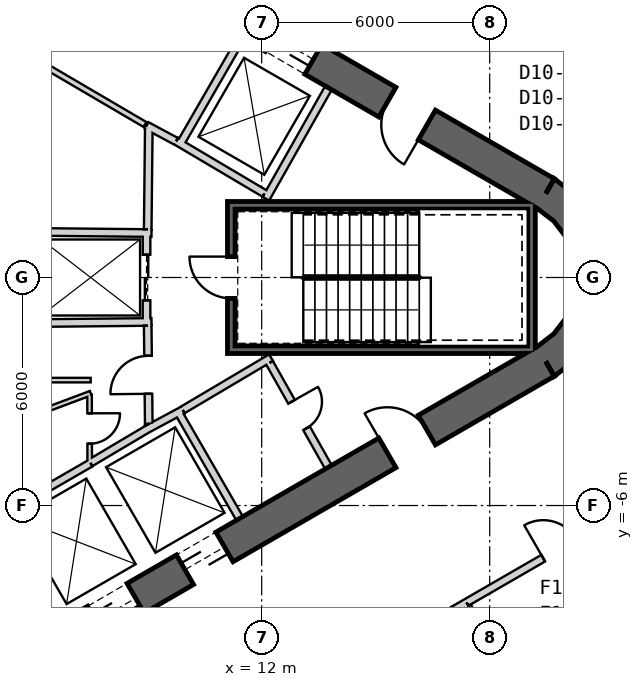
"""IFC4 building model, lengths in metres.
Left out: names, types, materials, properties, quantities, classifications, styles, units other than length and angle.
Written with IfcOpenShell. Run it as: python <this file> out.ifc"""

import sys

from ifc_helpers import new_model, si_unit, direction, frame, frame_2d, origin, place, context, subcontext, project, spatial, polyline, rectangle, outline, extrude, element, fill, save


model = new_model("IFC4")
c1 = context("Model", 3, precision=1e-05, world=origin(), true_north=direction((0.0, 1.0)))
c2 = subcontext(c1, "Body", "Model", "MODEL_VIEW")
j1 = project(units=[si_unit("LENGTHUNIT", "METRE"), si_unit("PLANEANGLEUNIT", "RADIAN")], contexts=[c1])
p1 = place(None, origin())
s1 = spatial("IfcSite", under=j1, at=p1, CompositionType="ELEMENT")
p2 = place(p1, origin())
s2 = spatial("IfcBuilding", under=s1, at=p2, CompositionType="ELEMENT")
p3 = place(p2, frame((0.0, 0.0, 253.2)))
s3 = spatial("IfcBuildingStorey", under=s2, at=p3, CompositionType="ELEMENT", Elevation=253.2)
p4 = place(p3, frame((19.475, 2.208, 0.0), z_axis=(0.0, 0.0, 1.0), x_axis=(-0.866028369851, 0.499994862586, 0.0)))
e1 = element("IfcWall", 1, at=p4, inside=s3, PredefinedType="SHEAR", context=c2, shape_type="SweptSolid", body=[
    extrude(rectangle(XDim=31.523, YDim=0.9, at=frame_2d((15.762, 0.0))), origin(), (0.0, 0.0, 1.0), 4.0),
])
p5 = place(p4, frame((7.062, 0.0, 0.0)))
e2 = element("IfcOpeningElement", 2, at=p5, cuts=e1, PredefinedType="OPENING", context=c2, shape_type="SweptSolid", body=[
    extrude(rectangle(XDim=1.2, YDim=2.4, at=frame_2d((0.6, 1.2))), frame((0.0, 0.46, 0.0), z_axis=(0.0, -1.0, 0.0), x_axis=(1.0, 0.0, 0.0)), (0.0, 0.0, 1.0), 0.92),
])
p6 = place(p4, frame((3.612, 0.0, 0.0)))
e3 = element("IfcOpeningElement", 3, at=p6, cuts=e1, PredefinedType="OPENING", context=c2, shape_type="SweptSolid", body=[
    extrude(rectangle(XDim=1.2, YDim=2.4, at=frame_2d((0.6, 1.2))), frame((0.0, 0.46, 0.0), z_axis=(0.0, -1.0, 0.0), x_axis=(1.0, 0.0, 0.0)), (0.0, 0.0, 1.0), 0.92),
])
p7 = place(p4, frame((26.712, 0.0, 0.0)))
e4 = element("IfcOpeningElement", 4, at=p7, cuts=e1, PredefinedType="OPENING", context=c2, shape_type="SweptSolid", body=[
    extrude(rectangle(XDim=1.2, YDim=2.4, at=frame_2d((0.6, 1.2))), frame((0.0, 0.46, 0.0), z_axis=(0.0, -1.0, 0.0), x_axis=(1.0, 0.0, 0.0)), (0.0, 0.0, 1.0), 0.92),
])
p8 = place(p3, frame((-7.825, -17.97, 0.0), z_axis=(0.0, 0.0, 1.0), x_axis=(0.866028369851, 0.499994862586, 0.0)))
e5 = element("IfcWall", 5, at=p8, inside=s3, PredefinedType="SHEAR", context=c2, shape_type="SweptSolid", body=[
    extrude(rectangle(XDim=31.523, YDim=0.9, at=frame_2d((15.762, 0.0))), origin(), (0.0, 0.0, 1.0), 4.0),
])
p9 = place(p8, frame((7.062, 0.0, 0.0)))
e6 = element("IfcOpeningElement", 6, at=p9, cuts=e5, PredefinedType="OPENING", context=c2, shape_type="SweptSolid", body=[
    extrude(rectangle(XDim=1.2, YDim=2.4, at=frame_2d((0.6, 1.2))), frame((0.0, 0.46, 0.0), z_axis=(0.0, -1.0, 0.0), x_axis=(1.0, 0.0, 0.0)), (0.0, 0.0, 1.0), 0.92),
])
p10 = place(p8, frame((9.762, 0.0, 0.0)))
e7 = element("IfcOpeningElement", 7, at=p10, cuts=e5, PredefinedType="OPENING", context=c2, shape_type="SweptSolid", body=[
    extrude(rectangle(XDim=1.2, YDim=2.4, at=frame_2d((0.6, 1.2))), frame((0.0, 0.46, 0.0), z_axis=(0.0, -1.0, 0.0), x_axis=(1.0, 0.0, 0.0)), (0.0, 0.0, 1.0), 0.92),
])
p11 = place(p8, frame((12.462, 0.0, 0.0)))
e8 = element("IfcOpeningElement", 8, at=p11, cuts=e5, PredefinedType="OPENING", context=c2, shape_type="SweptSolid", body=[
    extrude(rectangle(XDim=1.2, YDim=2.4, at=frame_2d((0.6, 1.2))), frame((0.0, 0.46, 0.0), z_axis=(0.0, -1.0, 0.0), x_axis=(1.0, 0.0, 0.0)), (0.0, 0.0, 1.0), 0.92),
])
p12 = place(p8, frame((15.162, 0.0, 0.0)))
e9 = element("IfcOpeningElement", 9, at=p12, cuts=e5, PredefinedType="OPENING", context=c2, shape_type="SweptSolid", body=[
    extrude(rectangle(XDim=1.2, YDim=2.4, at=frame_2d((0.6, 1.2))), frame((0.0, 0.46, 0.0), z_axis=(0.0, -1.0, 0.0), x_axis=(1.0, 0.0, 0.0)), (0.0, 0.0, 1.0), 0.92),
])
p13 = place(p8, frame((17.862, 0.0, 0.0)))
e10 = element("IfcOpeningElement", 10, at=p13, cuts=e5, PredefinedType="OPENING", context=c2, shape_type="SweptSolid", body=[
    extrude(rectangle(XDim=1.2, YDim=2.4, at=frame_2d((0.6, 1.2))), frame((0.0, 0.46, 0.0), z_axis=(0.0, -1.0, 0.0), x_axis=(1.0, 0.0, 0.0)), (0.0, 0.0, 1.0), 0.92),
])
p14 = place(p8, frame((20.562, 0.0, 0.0)))
e11 = element("IfcOpeningElement", 11, at=p14, cuts=e5, PredefinedType="OPENING", context=c2, shape_type="SweptSolid", body=[
    extrude(rectangle(XDim=1.2, YDim=2.4, at=frame_2d((0.6, 1.2))), frame((0.0, 0.46, 0.0), z_axis=(0.0, -1.0, 0.0), x_axis=(1.0, 0.0, 0.0)), (0.0, 0.0, 1.0), 0.92),
])
p15 = place(p8, frame((26.712, 0.0, 0.0)))
e12 = element("IfcOpeningElement", 12, at=p15, cuts=e5, PredefinedType="OPENING", context=c2, shape_type="SweptSolid", body=[
    extrude(rectangle(XDim=1.2, YDim=2.4, at=frame_2d((0.6, 1.2))), frame((0.0, 0.46, 0.0), z_axis=(0.0, -1.0, 0.0), x_axis=(1.0, 0.0, 0.0)), (0.0, 0.0, 1.0), 0.92),
])
p16 = place(p8, frame((3.612, 0.0, 0.0)))
e13 = element("IfcOpeningElement", 13, at=p16, cuts=e5, PredefinedType="OPENING", context=c2, shape_type="SweptSolid", body=[
    extrude(rectangle(XDim=1.2, YDim=2.4, at=frame_2d((0.6, 1.2))), frame((0.0, 0.46, 0.0), z_axis=(0.0, -1.0, 0.0), x_axis=(1.0, 0.0, 0.0)), (0.0, 0.0, 1.0), 0.92),
])
p17 = place(p3, origin())
e14 = element("IfcWall", 14, at=p17, inside=s3, PredefinedType="SHEAR", context=c2, shape_type="SweptSolid", body=[
    extrude(outline(polyline([(19.7, -2.598), (20.321, -2.121), (20.798, -1.5), (21.098, -0.777), (21.2, 0.0), (21.098, 0.777), (20.798, 1.5), (20.321, 2.121), (19.7, 2.598), (19.25, 1.819), (19.685, 1.485), (20.019, 1.05), (20.229, 0.543), (20.3, 0.0), (20.229, -0.543), (20.019, -1.05), (19.685, -1.485), (19.25, -1.819), (19.7, -2.598)])), origin(), (0.0, 0.0, 1.0), 4.0),
])
p18 = place(p3, frame((9.847, 3.495, 0.0), z_axis=(0.0, 0.0, 1.0), x_axis=(0.499984717929, 0.866034226713, 0.0)))
e15 = element("IfcWall", 15, at=p18, inside=s3, PredefinedType="PLUMBINGWALL", context=c2, shape_type="SweptSolid", body=[
    extrude(rectangle(XDim=3.25, YDim=0.2, at=frame_2d((1.625, 0.0))), origin(), (0.0, 0.0, 1.0), 3.7),
])
p19 = place(p3, frame((12.11, 2.073, 0.0), z_axis=(0.0, 0.0, 1.0), x_axis=(0.49196600604, 0.870614408852, 0.0)))
e16 = element("IfcWall", 16, at=p19, inside=s3, PredefinedType="PLUMBINGWALL", context=c2, shape_type="SweptSolid", body=[
    extrude(rectangle(XDim=3.35, YDim=0.2, at=frame_2d((1.675, 0.0))), origin(), (0.0, 0.0, 1.0), 3.7),
])
p20 = place(p3, frame((12.073, 2.211, 0.0), z_axis=(0.0, 0.0, 1.0), x_axis=(-0.860414880418, 0.509594185166, 0.0)))
e17 = element("IfcWall", 17, at=p20, inside=s3, PredefinedType="PLUMBINGWALL", context=c2, shape_type="SweptSolid", body=[
    extrude(rectangle(XDim=2.7, YDim=0.2, at=frame_2d((1.35, 0.0))), origin(), (0.0, 0.0, 1.0), 3.7),
])
p21 = place(p3, frame((0.483, -8.936, 0.0), z_axis=(0.0, 0.0, 1.0), x_axis=(0.866030989016, 0.499990325971, 0.0)))
e18 = element("IfcWall", 18, at=p21, inside=s3, PredefinedType="PLUMBINGWALL", context=c2, shape_type="SweptSolid", body=[
    extrude(rectangle(XDim=8.1, YDim=0.2, at=frame_2d((4.05, 0.0))), origin(), (0.0, 0.0, 1.0), 3.7),
])
p22 = place(p3, frame((9.795, -3.525, 0.0), z_axis=(0.0, 0.0, 1.0), x_axis=(0.499984717929, -0.866034226713, 0.0)))
e19 = element("IfcWall", 19, at=p22, inside=s3, PredefinedType="PLUMBINGWALL", context=c2, shape_type="SweptSolid", body=[
    extrude(rectangle(XDim=3.25, YDim=0.2, at=frame_2d((1.625, 0.0))), origin(), (0.0, 0.0, 1.0), 3.7),
])
p23 = place(p3, frame((8.974, -3.999, 0.0), z_axis=(0.0, 0.0, 1.0), x_axis=(0.880907015104, 0.473289373154, 0.0)))
e20 = element("IfcWall", 20, at=p23, inside=s3, PredefinedType="PLUMBINGWALL", context=c2, shape_type="SweptSolid", body=[
    extrude(rectangle(XDim=1.078, YDim=0.2, at=frame_2d((0.539, 0.0))), origin(), (0.0, 0.0, 1.0), 3.7),
])
p24 = place(p3, frame((7.493, -4.878, 0.0), z_axis=(0.0, 0.0, 1.0), x_axis=(0.859981807212, 0.510324691999, 0.0)))
e21 = element("IfcWall", 21, at=p24, inside=s3, PredefinedType="PLUMBINGWALL", context=c2, shape_type="SweptSolid", body=[
    extrude(rectangle(XDim=1.845, YDim=0.2, at=frame_2d((0.922, 0.0))), origin(), (0.0, 0.0, 1.0), 3.7),
])
p25 = place(p3, frame((19.2, 1.9, -0.3), z_axis=(0.0, 0.0, 1.0), x_axis=(-1.0, 0.0, 0.0)))
e22 = element("IfcWall", 22, at=p25, inside=s3, PredefinedType="SHEAR", context=c2, shape_type="SweptSolid", body=[
    extrude(rectangle(XDim=8.1, YDim=0.2, at=frame_2d((4.05, 0.0))), origin(), (0.0, 0.0, 1.0), 4.0),
])
p26 = place(p3, frame((19.1, -2.0, -0.3), z_axis=(0.0, 0.0, 1.0), x_axis=(0.0, 1.0, 0.0)))
e23 = element("IfcWall", 23, at=p26, inside=s3, PredefinedType="SHEAR", context=c2, shape_type="SweptSolid", body=[
    extrude(rectangle(XDim=3.8, YDim=0.2, at=frame_2d((1.9, 0.0))), origin(), (0.0, 0.0, 1.0), 4.0),
])
p27 = place(p3, frame((11.1, -1.9, -0.3), z_axis=(0.0, 0.0, 1.0), x_axis=(1.0, 0.0, 0.0)))
e24 = element("IfcWall", 24, at=p27, inside=s3, PredefinedType="SHEAR", context=c2, shape_type="SweptSolid", body=[
    extrude(rectangle(XDim=7.9, YDim=0.2, at=frame_2d((3.95, 0.0))), origin(), (0.0, 0.0, 1.0), 4.0),
])
p28 = place(p3, frame((11.2, -1.8, -0.3), z_axis=(0.0, 0.0, 1.0), x_axis=(0.0, 1.0, 0.0)))
e25 = element("IfcWall", 25, at=p28, inside=s3, PredefinedType="SHEAR", context=c2, shape_type="SweptSolid", body=[
    extrude(rectangle(XDim=3.6, YDim=0.2, at=frame_2d((1.8, 0.0))), origin(), (0.0, 0.0, 1.0), 4.0),
])
p29 = place(p28, frame((1.25, 0.0, 0.3)))
e26 = element("IfcOpeningElement", 26, at=p29, cuts=e25, PredefinedType="OPENING", context=c2, shape_type="SweptSolid", body=[
    extrude(rectangle(XDim=1.1, YDim=2.1, at=frame_2d((0.55, 1.05))), frame((0.0, 0.11, 0.0), z_axis=(0.0, -1.0, 0.0), x_axis=(1.0, 0.0, 0.0)), (0.0, 0.0, 1.0), 0.22),
])
p30 = place(p3, frame((8.97, 1.2, 0.0), z_axis=(0.0, 0.0, 1.0), x_axis=(0.0, -1.0, 0.0)))
e27 = element("IfcWall", 27, at=p30, inside=s3, PredefinedType="PLUMBINGWALL", context=c2, shape_type="SweptSolid", body=[
    extrude(rectangle(XDim=2.4, YDim=0.2, at=frame_2d((1.2, 0.0))), origin(), (0.0, 0.0, 1.0), 3.7),
])
p31 = place(p30, frame((0.6, 0.0, 0.0)))
e28 = element("IfcOpeningElement", 28, at=p31, cuts=e27, PredefinedType="OPENING", context=c2, shape_type="SweptSolid", body=[
    extrude(rectangle(XDim=1.2, YDim=2.4, at=frame_2d((0.6, 1.2))), frame((0.0, 0.11, 0.0), z_axis=(0.0, -1.0, 0.0), x_axis=(1.0, 0.0, 0.0)), (0.0, 0.0, 1.0), 0.22),
])
p32 = place(p3, frame((6.0, 1.2, 0.0), z_axis=(0.0, 0.0, 1.0), x_axis=(0.999949988, -0.010001074852, 0.0)))
e29 = element("IfcWall", 29, at=p32, inside=s3, PredefinedType="PLUMBINGWALL", context=c2, shape_type="SweptSolid", body=[
    extrude(rectangle(XDim=3.1, YDim=0.2, at=frame_2d((1.55, 0.0))), origin(), (0.0, 0.0, 1.0), 3.7),
])
p33 = place(p3, frame((5.9, -1.201, 0.0), z_axis=(0.0, 0.0, 1.0), x_axis=(0.999950064753, 0.009993397809, 0.0)))
e30 = element("IfcWall", 30, at=p33, inside=s3, PredefinedType="PLUMBINGWALL", context=c2, shape_type="SweptSolid", body=[
    extrude(rectangle(XDim=3.2, YDim=0.2, at=frame_2d((1.6, 0.0))), origin(), (0.0, 0.0, 1.0), 3.7),
])
p34 = place(p3, frame((8.974, 3.999, 0.0), z_axis=(0.0, 0.0, 1.0), x_axis=(0.880917147855, -0.473270513147, 0.0)))
e31 = element("IfcWall", 31, at=p34, inside=s3, PredefinedType="PARTITIONING", context=c2, shape_type="SweptSolid", body=[
    extrude(rectangle(XDim=0.878, YDim=0.2, at=frame_2d((0.439, 0.0))), origin(), (0.0, 0.0, 1.0), 3.7),
])
p35 = place(p3, frame((8.931, 4.025, 0.0), z_axis=(0.0, 0.0, 1.0), x_axis=(-0.862666884027, 0.505772525157, 0.0)))
e32 = element("IfcWall", 32, at=p35, inside=s3, PredefinedType="PLUMBINGWALL", context=c2, shape_type="SweptSolid", body=[
    extrude(rectangle(XDim=4.372, YDim=0.15, at=frame_2d((2.186, 0.0))), origin(), (0.0, 0.0, 1.0), 3.7),
])
p36 = place(p3, frame((12.245, -2.109, 0.0), z_axis=(0.0, 0.0, 1.0), x_axis=(-0.860414880418, -0.509594185166, 0.0)))
e33 = element("IfcWall", 33, at=p36, inside=s3, PredefinedType="PARTITIONING", context=c2, shape_type="SweptSolid", body=[
    extrude(rectangle(XDim=2.7, YDim=0.2, at=frame_2d((1.35, 0.0))), origin(), (0.0, 0.0, 1.0), 3.7),
])
p37 = place(p3, frame((13.758, -4.99, 0.0), z_axis=(0.0, 0.0, 1.0), x_axis=(-0.491993409184, 0.87059892334, 0.0)))
e34 = element("IfcWall", 34, at=p37, inside=s3, PredefinedType="PARTITIONING", context=c2, shape_type="SweptSolid", body=[
    extrude(rectangle(XDim=3.15, YDim=0.2, at=frame_2d((1.575, 0.0))), origin(), (0.0, 0.0, 1.0), 3.7),
])
p38 = place(p37, frame((1.175, 0.0, 0.0)))
e35 = element("IfcOpeningElement", 35, at=p38, cuts=e34, PredefinedType="OPENING", context=c2, shape_type="SweptSolid", body=[
    extrude(rectangle(XDim=0.8, YDim=2.1, at=frame_2d((0.4, 1.05))), frame((0.0, 0.11, 0.0), z_axis=(0.0, -1.0, 0.0), x_axis=(1.0, 0.0, 0.0)), (0.0, 0.0, 1.0), 0.22),
])
p39 = place(p3, frame((9.001, 1.27, 0.0), z_axis=(0.0, 0.0, 1.0), x_axis=(0.01074821465, 0.999942236273, 0.0)))
e36 = element("IfcWall", 36, at=p39, inside=s3, PredefinedType="PARTITIONING", context=c2, shape_type="SweptSolid", body=[
    extrude(rectangle(XDim=2.726, YDim=0.2, at=frame_2d((1.363, 0.0))), origin(), (0.0, 0.0, 1.0), 3.7),
])
p40 = place(p3, frame((9.029, -3.851, 0.0), z_axis=(0.0, 0.0, 1.0), x_axis=(-0.010783593937, 0.99994185536, 0.0)))
e37 = element("IfcWall", 37, at=p40, inside=s3, PredefinedType="PARTITIONING", context=c2, shape_type="SweptSolid", body=[
    extrude(rectangle(XDim=2.581, YDim=0.2, at=frame_2d((1.291, 0.0))), origin(), (0.0, 0.0, 1.0), 3.7),
])
p41 = place(p40, frame((0.791, 0.0, 0.0)))
e38 = element("IfcOpeningElement", 38, at=p41, cuts=e37, PredefinedType="OPENING", context=c2, shape_type="SweptSolid", body=[
    extrude(rectangle(XDim=1.0, YDim=2.1, at=frame_2d((0.5, 1.05))), frame((0.0, 0.11, 0.0), z_axis=(0.0, -1.0, 0.0), x_axis=(1.0, 0.0, 0.0)), (0.0, 0.0, 1.0), 0.22),
])
p42 = place(p3, frame((7.5, -3.042, 0.0), z_axis=(0.0, 0.0, 1.0), x_axis=(-0.936345316301, -0.35108040196, 0.0)))
e39 = element("IfcWall", 39, at=p42, inside=s3, PredefinedType="PARTITIONING", context=c2, shape_type="SweptSolid", body=[
    extrude(rectangle(XDim=10.568, YDim=0.12, at=frame_2d((5.284, 0.0))), origin(), (0.0, 0.0, 1.0), 3.7),
])
p43 = place(p3, frame((7.5, -2.7, 0.0), z_axis=(0.0, 0.0, 1.0), x_axis=(-1.0, 0.0, 0.0)))
e40 = element("IfcWall", 40, at=p43, inside=s3, PredefinedType="PARTITIONING", context=c2, shape_type="SweptSolid", body=[
    extrude(rectangle(XDim=2.94, YDim=0.12, at=frame_2d((1.47, 0.0))), origin(), (0.0, 0.0, 1.0), 3.7),
])
p44 = place(p3, frame((7.475, -4.865, 0.0), z_axis=(0.0, 0.0, 1.0), x_axis=(-0.002330037535, 0.999997285459, 0.0)))
e41 = element("IfcWall", 41, at=p44, inside=s3, PredefinedType="PARTITIONING", context=c2, shape_type="SweptSolid", body=[
    extrude(rectangle(XDim=1.781, YDim=0.12, at=frame_2d((0.891, 0.0))), origin(), (0.0, 0.0, 1.0), 3.7),
])
p45 = place(p44, frame((0.49, 0.0, 0.0)))
e42 = element("IfcOpeningElement", 42, at=p45, cuts=e41, PredefinedType="OPENING", context=c2, shape_type="SweptSolid", body=[
    extrude(rectangle(XDim=0.8, YDim=2.1, at=frame_2d((0.4, 1.05))), frame((0.0, 0.07, 0.0), z_axis=(0.0, -1.0, 0.0), x_axis=(1.0, 0.0, 0.0)), (0.0, 0.0, 1.0), 0.14),
])
p46 = place(p3, frame((6.275, -14.968, 0.0), z_axis=(0.0, 0.0, 1.0), x_axis=(0.866025615516, 0.499999633269, 0.0)))
e43 = element("IfcWall", 43, at=p46, inside=s3, PredefinedType="PARTITIONING", context=c2, shape_type="SweptSolid", body=[
    extrude(rectangle(XDim=12.834, YDim=0.2, at=frame_2d((6.417, 0.0))), origin(), (0.0, 0.0, 1.0), 2.98),
])
p47 = place(p3, frame((17.39, -8.551, 0.0), z_axis=(0.0, 0.0, 1.0), x_axis=(0.866034791923, 0.499983738914, 0.0)))
e44 = element("IfcWall", 44, at=p47, inside=s3, PredefinedType="PARTITIONING", context=c2, shape_type="SweptSolid", body=[
    extrude(rectangle(XDim=5.662, YDim=0.2, at=frame_2d((2.831, 0.0))), origin(), (0.0, 0.0, 1.0), 2.98),
])
p48 = place(p47, frame((2.331, 0.0, 0.0)))
e45 = element("IfcOpeningElement", 45, at=p48, cuts=e44, PredefinedType="OPENING", context=c2, shape_type="SweptSolid", body=[
    extrude(rectangle(XDim=1.0, YDim=2.1, at=frame_2d((0.5, 1.05))), frame((0.0, 0.11, 0.0), z_axis=(0.0, -1.0, 0.0), x_axis=(1.0, 0.0, 0.0)), (0.0, 0.0, 1.0), 0.22),
])
p49 = place(p3, frame((17.416, -8.651, 0.0), z_axis=(0.0, 0.0, 1.0), x_axis=(0.45442670118, -0.890784133926, 0.0)))
e46 = element("IfcWall", 46, at=p49, inside=s3, PredefinedType="PARTITIONING", context=c2, shape_type="SweptSolid", body=[
    extrude(rectangle(XDim=9.512, YDim=0.2, at=frame_2d((4.756, 0.0))), origin(), (0.0, 0.0, 1.0), 2.98),
])
p50 = place(p29, origin())
e47 = element("IfcDoor", 47, at=p50, inside=s3, OperationType="SINGLE_SWING_LEFT", PredefinedType="USERDEFINED", context=c2, shape_type="SweptSolid", body=[
    extrude(rectangle(XDim=1.1, YDim=2.1, at=frame_2d((0.55, 1.05))), frame((0.0, 0.025, 0.0), z_axis=(0.0, -1.0, 0.0), x_axis=(1.0, 0.0, 0.0)), (0.0, 0.0, 1.0), 0.05),
])
fill(e26, e47)
p51 = place(p41, origin())
e48 = element("IfcDoor", 48, at=p51, inside=s3, OperationType="SINGLE_SWING_RIGHT", PredefinedType="USERDEFINED", context=c2, shape_type="SweptSolid", body=[
    extrude(rectangle(XDim=1.0, YDim=2.1, at=frame_2d((0.5, 1.05))), frame((0.0, 0.025, 0.0), z_axis=(0.0, -1.0, 0.0), x_axis=(1.0, 0.0, 0.0)), (0.0, 0.0, 1.0), 0.05),
])
fill(e38, e48)
p52 = place(p31, origin())
e49 = element("IfcDoor", 49, at=p52, inside=s3, OperationType="SLIDING_TO_LEFT", PredefinedType="USERDEFINED", context=c2, shape_type="SweptSolid", body=[
    extrude(rectangle(XDim=1.2, YDim=2.4, at=frame_2d((0.6, 1.2))), frame((0.0, 0.025, 0.0), z_axis=(0.0, -1.0, 0.0), x_axis=(1.0, 0.0, 0.0)), (0.0, 0.0, 1.0), 0.05),
])
fill(e28, e49)
p53 = place(p45, origin())
e50 = element("IfcDoor", 50, at=p53, inside=s3, OperationType="SINGLE_SWING_LEFT", PredefinedType="USERDEFINED", context=c2, shape_type="SweptSolid", body=[
    extrude(rectangle(XDim=0.8, YDim=2.1, at=frame_2d((0.4, 1.05))), frame((0.0, 0.025, 0.0), z_axis=(0.0, -1.0, 0.0), x_axis=(1.0, 0.0, 0.0)), (0.0, 0.0, 1.0), 0.05),
])
fill(e42, e50)
p54 = place(p38, origin())
e51 = element("IfcDoor", 51, at=p54, inside=s3, OperationType="SINGLE_SWING_LEFT", PredefinedType="USERDEFINED", context=c2, shape_type="SweptSolid", body=[
    extrude(rectangle(XDim=0.8, YDim=2.1, at=frame_2d((0.4, 1.05))), frame((0.0, 0.025, 0.0), z_axis=(0.0, -1.0, 0.0), x_axis=(1.0, 0.0, 0.0)), (0.0, 0.0, 1.0), 0.05),
])
fill(e35, e51)
p55 = place(p48, origin())
e52 = element("IfcDoor", 52, at=p55, inside=s3, OperationType="SINGLE_SWING_RIGHT", PredefinedType="USERDEFINED", context=c2, shape_type="SweptSolid", body=[
    extrude(rectangle(XDim=1.0, YDim=2.1, at=frame_2d((0.5, 1.05))), frame((0.0, 0.025, 0.0), z_axis=(0.0, -1.0, 0.0), x_axis=(1.0, 0.0, 0.0)), (0.0, 0.0, 1.0), 0.05),
])
fill(e45, e52)
p56 = place(p5, origin())
e53 = element("IfcDoor", 53, at=p56, inside=s3, OperationType="SLIDING_TO_LEFT", PredefinedType="USERDEFINED", context=c2, shape_type="SweptSolid", body=[
    extrude(rectangle(XDim=1.2, YDim=2.4, at=frame_2d((0.6, 1.2))), frame((0.0, 0.025, 0.0), z_axis=(0.0, -1.0, 0.0), x_axis=(1.0, 0.0, 0.0)), (0.0, 0.0, 1.0), 0.05),
])
fill(e2, e53)
p57 = place(p13, origin())
e54 = element("IfcDoor", 54, at=p57, inside=s3, OperationType="SLIDING_TO_LEFT", PredefinedType="USERDEFINED", context=c2, shape_type="SweptSolid", body=[
    extrude(rectangle(XDim=1.2, YDim=2.4, at=frame_2d((0.6, 1.2))), frame((0.0, 0.025, 0.0), z_axis=(0.0, -1.0, 0.0), x_axis=(1.0, 0.0, 0.0)), (0.0, 0.0, 1.0), 0.05),
])
fill(e10, e54)
p58 = place(p14, origin())
e55 = element("IfcDoor", 55, at=p58, inside=s3, OperationType="SLIDING_TO_LEFT", PredefinedType="USERDEFINED", context=c2, shape_type="SweptSolid", body=[
    extrude(rectangle(XDim=1.2, YDim=2.4, at=frame_2d((0.6, 1.2))), frame((0.0, 0.025, 0.0), z_axis=(0.0, -1.0, 0.0), x_axis=(1.0, 0.0, 0.0)), (0.0, 0.0, 1.0), 0.05),
])
fill(e11, e55)
p59 = place(p15, origin())
e56 = element("IfcDoor", 56, at=p59, inside=s3, OperationType="SINGLE_SWING_LEFT", PredefinedType="USERDEFINED", context=c2, shape_type="SweptSolid", body=[
    extrude(rectangle(XDim=1.2, YDim=2.4, at=frame_2d((0.6, 1.2))), frame((0.0, 0.025, 0.0), z_axis=(0.0, -1.0, 0.0), x_axis=(1.0, 0.0, 0.0)), (0.0, 0.0, 1.0), 0.05),
])
fill(e12, e56)
p60 = place(p6, origin())
e57 = element("IfcDoor", 57, at=p60, inside=s3, OperationType="SINGLE_SWING_RIGHT", PredefinedType="USERDEFINED", context=c2, shape_type="SweptSolid", body=[
    extrude(rectangle(XDim=1.2, YDim=2.4, at=frame_2d((0.6, 1.2))), frame((0.0, 0.025, 0.0), z_axis=(0.0, -1.0, 0.0), x_axis=(1.0, 0.0, 0.0)), (0.0, 0.0, 1.0), 0.05),
])
fill(e3, e57)
save(model, sys.argv[1])
